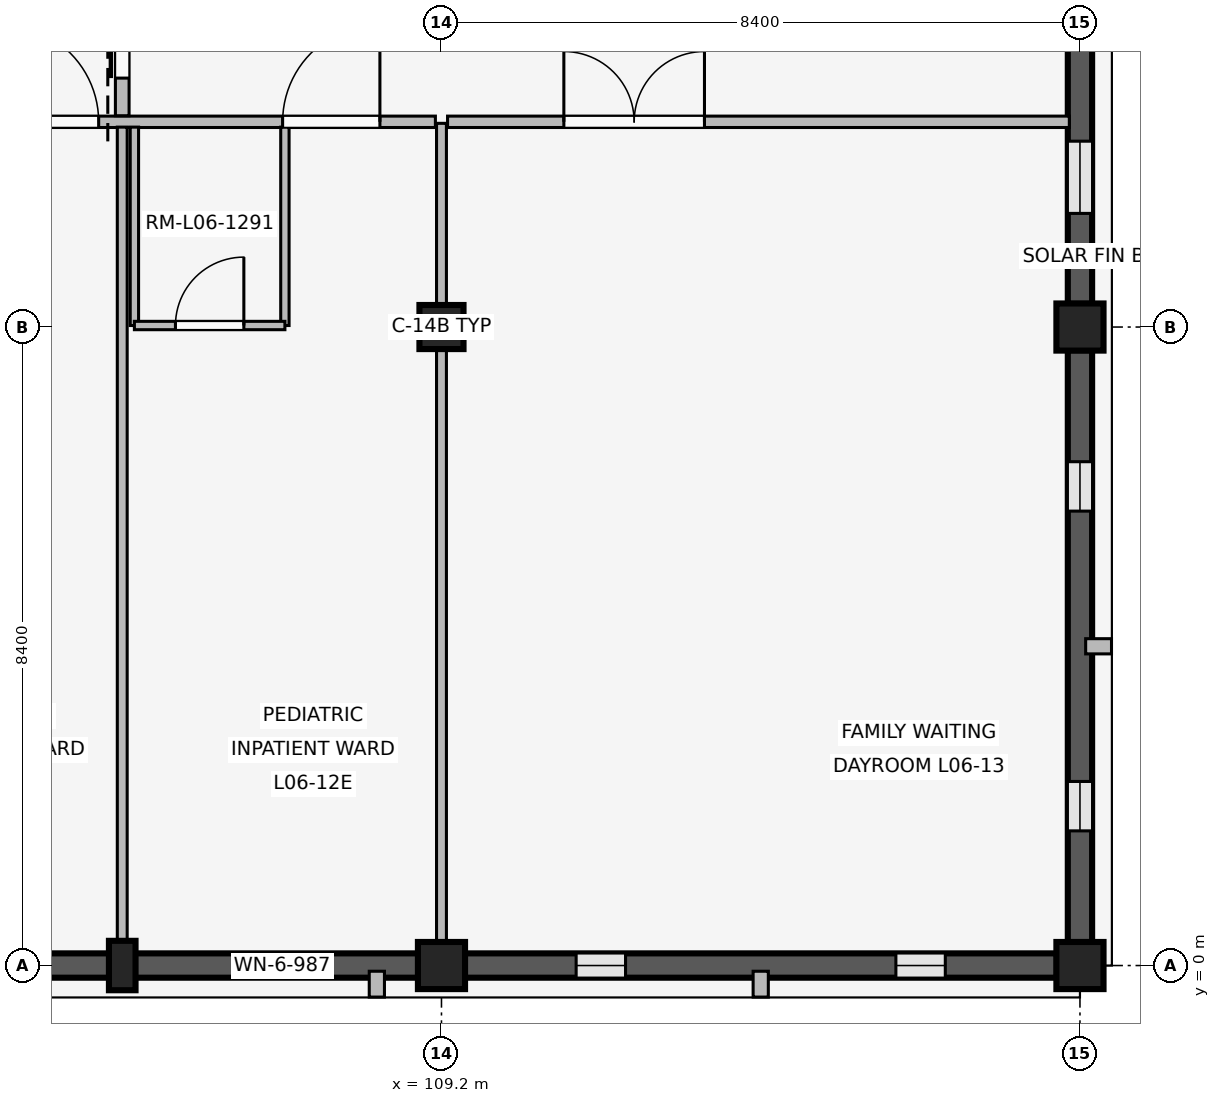
"""IFC4 building model, lengths in metres.
Left out: names, types, materials, properties, quantities, classifications, styles, units other than length and angle.
Written with IfcOpenShell. Run it as: python <this file> out.ifc"""

import sys

from ifc_helpers import new_model, si_unit, direction, frame, frame_2d, origin, origin_2d, place, context, subcontext, project, spatial, rectangle, extrude, element, fill, save


model = new_model("IFC4")
c1 = context("Model", 3, precision=1e-05, world=origin(), true_north=direction((0.0, 1.0)))
c2 = subcontext(c1, "Body", "Model", "MODEL_VIEW")
j1 = project(units=[si_unit("LENGTHUNIT", "METRE"), si_unit("PLANEANGLEUNIT", "RADIAN")], contexts=[c1])
p1 = place(None, origin())
s1 = spatial("IfcSite", under=j1, at=p1, CompositionType="ELEMENT")
p2 = place(p1, origin())
s2 = spatial("IfcBuilding", under=s1, at=p2, CompositionType="ELEMENT")
p3 = place(p2, frame((0.0, 0.0, 24.6)))
s3 = spatial("IfcBuildingStorey", under=s2, at=p3, CompositionType="ELEMENT", Elevation=24.6)
p4 = place(p3, frame((109.2, 0.0, 0.0), z_axis=(0.0, 0.0, 1.0), x_axis=(1.0, 0.0, 0.0)))
e1 = element("IfcColumn", 1, at=p4, inside=s3, PredefinedType="COLUMN", context=c2, shape_type="SweptSolid", body=[
    extrude(rectangle(XDim=0.62, YDim=0.62, at=origin_2d()), origin(), (0.0, 0.0, 1.0), 4.2),
])
p5 = place(p3, frame((109.2, 8.4, 0.0), z_axis=(0.0, 0.0, 1.0), x_axis=(1.0, 0.0, 0.0)))
e2 = element("IfcColumn", 2, at=p5, inside=s3, PredefinedType="COLUMN", context=c2, shape_type="SweptSolid", body=[
    extrude(rectangle(XDim=0.58, YDim=0.58, at=origin_2d()), origin(), (0.0, 0.0, 1.0), 4.2),
])
for number, where, z_axis, x_axis in (
    (3, (117.6, 0.0, 0.0), (0.0, 0.0, 1.0), (1.0, 0.0, 0.0)),
    (4, (117.6, 8.4, 0.0), (0.0, 0.0, 1.0), (1.0, 0.0, 0.0)),
):
    element("IfcColumn", number, at=place(p3, frame(where, z_axis=z_axis, x_axis=x_axis)), inside=s3, PredefinedType="COLUMN", context=c2, shape_type="SweptSolid", body=[
        extrude(rectangle(XDim=0.62, YDim=0.62, at=origin_2d()), origin(), (0.0, 0.0, 1.0), 4.2),
    ])
p6 = place(p3, frame((105.0, 0.0, 0.0), z_axis=(0.0, 0.0, 1.0), x_axis=(1.0, 0.0, 0.0)))
e5 = element("IfcColumn", 5, at=p6, inside=s3, PredefinedType="PILASTER", context=c2, shape_type="SweptSolid", body=[
    extrude(rectangle(XDim=0.35, YDim=0.65, at=origin_2d()), origin(), (0.0, 0.0, 1.0), 4.2),
])
p7 = place(p3, frame((108.895, 0.0, 0.0), z_axis=(0.0, 0.0, 1.0), x_axis=(-1.0, 0.0, 0.0)))
e6 = element("IfcWall", 6, at=p7, inside=s3, PredefinedType="SOLIDWALL", context=c2, shape_type="SweptSolid", body=[
    extrude(rectangle(XDim=7.79, YDim=0.32, at=frame_2d((3.895, 0.0))), origin(), (0.0, 0.0, 1.0), 3.34),
])
p8 = place(p7, frame((1.417, 0.0, 0.85)))
e7 = element("IfcOpeningElement", 7, at=p8, cuts=e6, PredefinedType="OPENING", context=c2, shape_type="SweptSolid", body=[
    extrude(rectangle(XDim=0.75, YDim=1.85, at=frame_2d((0.375, 0.925))), frame((0.0, 0.17, 0.0), z_axis=(0.0, -1.0, 0.0), x_axis=(1.0, 0.0, 0.0)), (0.0, 0.0, 1.0), 0.34),
])
p9 = place(p7, frame((5.623, 0.0, 0.85)))
e8 = element("IfcOpeningElement", 8, at=p9, cuts=e6, PredefinedType="OPENING", context=c2, shape_type="SweptSolid", body=[
    extrude(rectangle(XDim=0.75, YDim=1.85, at=frame_2d((0.375, 0.925))), frame((0.0, 0.17, 0.0), z_axis=(0.0, -1.0, 0.0), x_axis=(1.0, 0.0, 0.0)), (0.0, 0.0, 1.0), 0.34),
])
p10 = place(p3, frame((108.35, -0.075, 0.0), z_axis=(0.0, 0.0, 1.0), x_axis=(0.0, -1.0, 0.0)))
e9 = element("IfcWall", 9, at=p10, inside=s3, PredefinedType="ELEMENTEDWALL", context=c2, shape_type="SweptSolid", body=[
    extrude(rectangle(XDim=0.34, YDim=0.2, at=frame_2d((0.17, 0.0))), origin(), (0.0, 0.0, 1.0), 3.32),
])
p11 = place(p3, frame((117.295, 0.0, 0.0), z_axis=(0.0, 0.0, 1.0), x_axis=(-1.0, 0.0, 0.0)))
e10 = element("IfcWall", 10, at=p11, inside=s3, PredefinedType="SOLIDWALL", context=c2, shape_type="SweptSolid", body=[
    extrude(rectangle(XDim=7.79, YDim=0.32, at=frame_2d((3.895, 0.0))), origin(), (0.0, 0.0, 1.0), 3.34),
])
p12 = place(p11, frame((1.467, 0.0, 0.85)))
e11 = element("IfcOpeningElement", 11, at=p12, cuts=e10, PredefinedType="OPENING", context=c2, shape_type="SweptSolid", body=[
    extrude(rectangle(XDim=0.65, YDim=1.75, at=frame_2d((0.325, 0.875))), frame((0.0, 0.17, 0.0), z_axis=(0.0, -1.0, 0.0), x_axis=(1.0, 0.0, 0.0)), (0.0, 0.0, 1.0), 0.34),
])
p13 = place(p11, frame((5.673, 0.0, 0.85)))
e12 = element("IfcOpeningElement", 12, at=p13, cuts=e10, PredefinedType="OPENING", context=c2, shape_type="SweptSolid", body=[
    extrude(rectangle(XDim=0.65, YDim=1.75, at=frame_2d((0.325, 0.875))), frame((0.0, 0.17, 0.0), z_axis=(0.0, -1.0, 0.0), x_axis=(1.0, 0.0, 0.0)), (0.0, 0.0, 1.0), 0.34),
])
p14 = place(p3, frame((113.4, -0.075, 0.0), z_axis=(0.0, 0.0, 1.0), x_axis=(0.0, -1.0, 0.0)))
e13 = element("IfcWall", 13, at=p14, inside=s3, PredefinedType="ELEMENTEDWALL", context=c2, shape_type="SweptSolid", body=[
    extrude(rectangle(XDim=0.34, YDim=0.2, at=frame_2d((0.17, 0.0))), origin(), (0.0, 0.0, 1.0), 3.32),
])
p15 = place(p3, frame((117.6, 8.095, 0.0), z_axis=(0.0, 0.0, 1.0), x_axis=(0.0, -1.0, 0.0)))
e14 = element("IfcWall", 14, at=p15, inside=s3, PredefinedType="SOLIDWALL", context=c2, shape_type="SweptSolid", body=[
    extrude(rectangle(XDim=7.79, YDim=0.32, at=frame_2d((3.895, 0.0))), origin(), (0.0, 0.0, 1.0), 3.34),
])
p16 = place(p15, frame((1.467, 0.0, 0.85)))
e15 = element("IfcOpeningElement", 15, at=p16, cuts=e14, PredefinedType="OPENING", context=c2, shape_type="SweptSolid", body=[
    extrude(rectangle(XDim=0.65, YDim=1.75, at=frame_2d((0.325, 0.875))), frame((0.0, 0.17, 0.0), z_axis=(0.0, -1.0, 0.0), x_axis=(1.0, 0.0, 0.0)), (0.0, 0.0, 1.0), 0.34),
])
p17 = place(p15, frame((5.673, 0.0, 0.85)))
e16 = element("IfcOpeningElement", 16, at=p17, cuts=e14, PredefinedType="OPENING", context=c2, shape_type="SweptSolid", body=[
    extrude(rectangle(XDim=0.65, YDim=1.75, at=frame_2d((0.325, 0.875))), frame((0.0, 0.17, 0.0), z_axis=(0.0, -1.0, 0.0), x_axis=(1.0, 0.0, 0.0)), (0.0, 0.0, 1.0), 0.34),
])
p18 = place(p3, frame((117.675, 4.2, 0.0), z_axis=(0.0, 0.0, 1.0), x_axis=(1.0, 0.0, 0.0)))
e17 = element("IfcWall", 17, at=p18, inside=s3, PredefinedType="ELEMENTEDWALL", context=c2, shape_type="SweptSolid", body=[
    extrude(rectangle(XDim=0.34, YDim=0.2, at=frame_2d((0.17, 0.0))), origin(), (0.0, 0.0, 1.0), 3.32),
])
p19 = place(p3, frame((117.6, 16.495, 0.0), z_axis=(0.0, 0.0, 1.0), x_axis=(0.0, -1.0, 0.0)))
e18 = element("IfcWall", 18, at=p19, inside=s3, PredefinedType="SOLIDWALL", context=c2, shape_type="SweptSolid", body=[
    extrude(rectangle(XDim=7.79, YDim=0.32, at=frame_2d((3.895, 0.0))), origin(), (0.0, 0.0, 1.0), 3.34),
])
p20 = place(p19, frame((1.19, 0.0, 0.85)))
e19 = element("IfcOpeningElement", 19, at=p20, cuts=e18, PredefinedType="OPENING", context=c2, shape_type="SweptSolid", body=[
    extrude(rectangle(XDim=0.95, YDim=1.6, at=frame_2d((0.475, 0.8))), frame((0.0, 0.17, 0.0), z_axis=(0.0, -1.0, 0.0), x_axis=(1.0, 0.0, 0.0)), (0.0, 0.0, 1.0), 0.34),
])
p21 = place(p19, frame((5.65, 0.0, 0.85)))
e20 = element("IfcOpeningElement", 20, at=p21, cuts=e18, PredefinedType="OPENING", context=c2, shape_type="SweptSolid", body=[
    extrude(rectangle(XDim=0.95, YDim=1.6, at=frame_2d((0.475, 0.8))), frame((0.0, 0.17, 0.0), z_axis=(0.0, -1.0, 0.0), x_axis=(1.0, 0.0, 0.0)), (0.0, 0.0, 1.0), 0.34),
])
p22 = place(p3, frame((101.16, 11.1, 0.0), z_axis=(0.0, 0.0, 1.0), x_axis=(1.0, 0.0, 0.0)))
e21 = element("IfcWall", 21, at=p22, inside=s3, PredefinedType="PARTITIONING", context=c2, shape_type="SweptSolid", body=[
    extrude(rectangle(XDim=7.96, YDim=0.15, at=frame_2d((3.98, 0.0))), origin(), (0.0, 0.0, 1.0), 3.32),
])
p23 = place(p22, frame((2.25, 0.0, 0.0)))
e22 = element("IfcOpeningElement", 22, at=p23, cuts=e21, PredefinedType="OPENING", context=c2, shape_type="SweptSolid", body=[
    extrude(rectangle(XDim=1.28, YDim=2.2, at=frame_2d((0.64, 1.1))), frame((0.0, 0.085, 0.0), z_axis=(0.0, -1.0, 0.0), x_axis=(1.0, 0.0, 0.0)), (0.0, 0.0, 1.0), 0.17),
])
p24 = place(p22, frame((5.95, 0.0, 0.0)))
e23 = element("IfcOpeningElement", 23, at=p24, cuts=e21, PredefinedType="OPENING", context=c2, shape_type="SweptSolid", body=[
    extrude(rectangle(XDim=1.28, YDim=2.2, at=frame_2d((0.64, 1.1))), frame((0.0, 0.085, 0.0), z_axis=(0.0, -1.0, 0.0), x_axis=(1.0, 0.0, 0.0)), (0.0, 0.0, 1.0), 0.17),
])
p25 = place(p3, frame((105.0, 0.1, 0.0), z_axis=(0.0, 0.0, 1.0), x_axis=(0.0, 1.0, 0.0)))
e24 = element("IfcWall", 24, at=p25, inside=s3, PredefinedType="PARTITIONING", context=c2, shape_type="SweptSolid", body=[
    extrude(rectangle(XDim=10.93, YDim=0.13, at=frame_2d((5.465, 0.0))), origin(), (0.0, 0.0, 1.0), 3.32),
])
for number, where, z_axis, x_axis in (
    (25, (105.16, 8.42, 0.0), (0.0, 0.0, 1.0), (0.0, 1.0, 0.0)),
    (26, (107.14, 8.42, 0.0), (0.0, 0.0, 1.0), (0.0, 1.0, 0.0)),
):
    element("IfcWall", number, at=place(p3, frame(where, z_axis=z_axis, x_axis=x_axis)), inside=s3, PredefinedType="PARTITIONING", context=c2, shape_type="SweptSolid", body=[
        extrude(rectangle(XDim=2.61, YDim=0.11, at=frame_2d((1.305, 0.0))), origin(), (0.0, 0.0, 1.0), 3.32),
    ])
p26 = place(p3, frame((105.16, 8.42, 0.0), z_axis=(0.0, 0.0, 1.0), x_axis=(1.0, 0.0, 0.0)))
e27 = element("IfcWall", 27, at=p26, inside=s3, PredefinedType="PARTITIONING", context=c2, shape_type="SweptSolid", body=[
    extrude(rectangle(XDim=1.98, YDim=0.11, at=frame_2d((0.99, 0.0))), origin(), (0.0, 0.0, 1.0), 3.32),
])
p27 = place(p26, frame((0.54, 0.0, 0.0)))
e28 = element("IfcOpeningElement", 28, at=p27, cuts=e27, PredefinedType="OPENING", context=c2, shape_type="SweptSolid", body=[
    extrude(rectangle(XDim=0.9, YDim=2.1, at=frame_2d((0.45, 1.05))), frame((0.0, 0.065, 0.0), z_axis=(0.0, -1.0, 0.0), x_axis=(1.0, 0.0, 0.0)), (0.0, 0.0, 1.0), 0.13),
])
p28 = place(p3, frame((105.0, 11.18, 0.0), z_axis=(0.0, 0.0, 1.0), x_axis=(0.0, 1.0, 0.0)))
e29 = element("IfcWall", 29, at=p28, inside=s3, PredefinedType="PARTITIONING", context=c2, shape_type="SweptSolid", body=[
    extrude(rectangle(XDim=2.84, YDim=0.18, at=frame_2d((1.42, 0.0))), origin(), (0.0, 0.0, 1.0), 3.32),
])
p29 = place(p28, frame((0.495, 0.0, 0.0)))
e30 = element("IfcOpeningElement", 30, at=p29, cuts=e29, PredefinedType="OPENING", context=c2, shape_type="SweptSolid", body=[
    extrude(rectangle(XDim=1.85, YDim=2.3, at=frame_2d((0.925, 1.15))), frame((0.0, 0.1, 0.0), z_axis=(0.0, -1.0, 0.0), x_axis=(1.0, 0.0, 0.0)), (0.0, 0.0, 1.0), 0.2),
])
p30 = place(p3, frame((109.2, 0.14, 0.0), z_axis=(0.0, 0.0, 1.0), x_axis=(0.0, 1.0, 0.0)))
e31 = element("IfcWall", 31, at=p30, inside=s3, PredefinedType="PARTITIONING", context=c2, shape_type="SweptSolid", body=[
    extrude(rectangle(XDim=10.94, YDim=0.13, at=frame_2d((5.47, 0.0))), origin(), (0.0, 0.0, 1.0), 3.32),
])
p31 = place(p3, frame((109.28, 11.1, 0.0), z_axis=(0.0, 0.0, 1.0), x_axis=(1.0, 0.0, 0.0)))
e32 = element("IfcWall", 32, at=p31, inside=s3, PredefinedType="PARTITIONING", context=c2, shape_type="SweptSolid", body=[
    extrude(rectangle(XDim=8.18, YDim=0.15, at=frame_2d((4.09, 0.0))), origin(), (0.0, 0.0, 1.0), 3.32),
])
p32 = place(p31, frame((1.53, 0.0, 0.0)))
e33 = element("IfcOpeningElement", 33, at=p32, cuts=e32, PredefinedType="OPENING", context=c2, shape_type="SweptSolid", body=[
    extrude(rectangle(XDim=1.85, YDim=2.3, at=frame_2d((0.925, 1.15))), frame((0.0, 0.085, 0.0), z_axis=(0.0, -1.0, 0.0), x_axis=(1.0, 0.0, 0.0)), (0.0, 0.0, 1.0), 0.17),
])
p33 = place(p8, origin())
e34 = element("IfcWindow", 34, at=p33, inside=s3, PartitioningType="SINGLE_PANEL", PredefinedType="WINDOW", context=c2, shape_type="SweptSolid", body=[
    extrude(rectangle(XDim=0.75, YDim=1.85, at=frame_2d((0.375, 0.925))), frame((0.0, 0.03, 0.0), z_axis=(0.0, -1.0, 0.0), x_axis=(1.0, 0.0, 0.0)), (0.0, 0.0, 1.0), 0.06),
])
fill(e7, e34)
p34 = place(p12, origin())
e35 = element("IfcWindow", 35, at=p34, inside=s3, PartitioningType="SINGLE_PANEL", PredefinedType="WINDOW", context=c2, shape_type="SweptSolid", body=[
    extrude(rectangle(XDim=0.65, YDim=1.75, at=frame_2d((0.325, 0.875))), frame((0.0, 0.03, 0.0), z_axis=(0.0, -1.0, 0.0), x_axis=(1.0, 0.0, 0.0)), (0.0, 0.0, 1.0), 0.06),
])
fill(e11, e35)
p35 = place(p13, origin())
e36 = element("IfcWindow", 36, at=p35, inside=s3, PartitioningType="SINGLE_PANEL", PredefinedType="WINDOW", context=c2, shape_type="SweptSolid", body=[
    extrude(rectangle(XDim=0.65, YDim=1.75, at=frame_2d((0.325, 0.875))), frame((0.0, 0.03, 0.0), z_axis=(0.0, -1.0, 0.0), x_axis=(1.0, 0.0, 0.0)), (0.0, 0.0, 1.0), 0.06),
])
fill(e12, e36)
p36 = place(p16, origin())
e37 = element("IfcWindow", 37, at=p36, inside=s3, PartitioningType="SINGLE_PANEL", PredefinedType="WINDOW", context=c2, shape_type="SweptSolid", body=[
    extrude(rectangle(XDim=0.65, YDim=1.75, at=frame_2d((0.325, 0.875))), frame((0.0, 0.03, 0.0), z_axis=(0.0, -1.0, 0.0), x_axis=(1.0, 0.0, 0.0)), (0.0, 0.0, 1.0), 0.06),
])
fill(e15, e37)
p37 = place(p17, origin())
e38 = element("IfcWindow", 38, at=p37, inside=s3, PartitioningType="SINGLE_PANEL", PredefinedType="WINDOW", context=c2, shape_type="SweptSolid", body=[
    extrude(rectangle(XDim=0.65, YDim=1.75, at=frame_2d((0.325, 0.875))), frame((0.0, 0.03, 0.0), z_axis=(0.0, -1.0, 0.0), x_axis=(1.0, 0.0, 0.0)), (0.0, 0.0, 1.0), 0.06),
])
fill(e16, e38)
p38 = place(p21, origin())
e39 = element("IfcWindow", 39, at=p38, inside=s3, PartitioningType="SINGLE_PANEL", PredefinedType="WINDOW", context=c2, shape_type="SweptSolid", body=[
    extrude(rectangle(XDim=0.95, YDim=1.6, at=frame_2d((0.475, 0.8))), frame((0.0, 0.03, 0.0), z_axis=(0.0, -1.0, 0.0), x_axis=(1.0, 0.0, 0.0)), (0.0, 0.0, 1.0), 0.06),
])
fill(e20, e39)
p39 = place(p23, origin())
e40 = element("IfcDoor", 40, at=p39, inside=s3, OperationType="SINGLE_SWING_LEFT", PredefinedType="DOOR", context=c2, shape_type="SweptSolid", body=[
    extrude(rectangle(XDim=1.28, YDim=2.2, at=frame_2d((0.64, 1.1))), frame((0.0, 0.025, 0.0), z_axis=(0.0, -1.0, 0.0), x_axis=(1.0, 0.0, 0.0)), (0.0, 0.0, 1.0), 0.05),
])
fill(e22, e40)
p40 = place(p24, origin())
e41 = element("IfcDoor", 41, at=p40, inside=s3, OperationType="SINGLE_SWING_RIGHT", PredefinedType="DOOR", context=c2, shape_type="SweptSolid", body=[
    extrude(rectangle(XDim=1.28, YDim=2.2, at=frame_2d((0.64, 1.1))), frame((0.0, 0.025, 0.0), z_axis=(0.0, -1.0, 0.0), x_axis=(1.0, 0.0, 0.0)), (0.0, 0.0, 1.0), 0.05),
])
fill(e23, e41)
p41 = place(p27, origin())
e42 = element("IfcDoor", 42, at=p41, inside=s3, OperationType="SINGLE_SWING_RIGHT", PredefinedType="DOOR", context=c2, shape_type="SweptSolid", body=[
    extrude(rectangle(XDim=0.9, YDim=2.1, at=frame_2d((0.45, 1.05))), frame((0.0, 0.025, 0.0), z_axis=(0.0, -1.0, 0.0), x_axis=(1.0, 0.0, 0.0)), (0.0, 0.0, 1.0), 0.05),
])
fill(e28, e42)
p42 = place(p29, origin())
e43 = element("IfcDoor", 43, at=p42, inside=s3, OperationType="SLIDING_TO_LEFT", PredefinedType="DOOR", context=c2, shape_type="SweptSolid", body=[
    extrude(rectangle(XDim=1.85, YDim=2.3, at=frame_2d((0.925, 1.15))), frame((0.0, 0.025, 0.0), z_axis=(0.0, -1.0, 0.0), x_axis=(1.0, 0.0, 0.0)), (0.0, 0.0, 1.0), 0.05),
])
fill(e30, e43)
p43 = place(p32, origin())
e44 = element("IfcDoor", 44, at=p43, inside=s3, OperationType="DOUBLE_SWING_LEFT", PredefinedType="DOOR", context=c2, shape_type="SweptSolid", body=[
    extrude(rectangle(XDim=1.85, YDim=2.3, at=frame_2d((0.925, 1.15))), frame((0.0, 0.025, 0.0), z_axis=(0.0, -1.0, 0.0), x_axis=(1.0, 0.0, 0.0)), (0.0, 0.0, 1.0), 0.05),
])
fill(e33, e44)
save(model, sys.argv[1])
